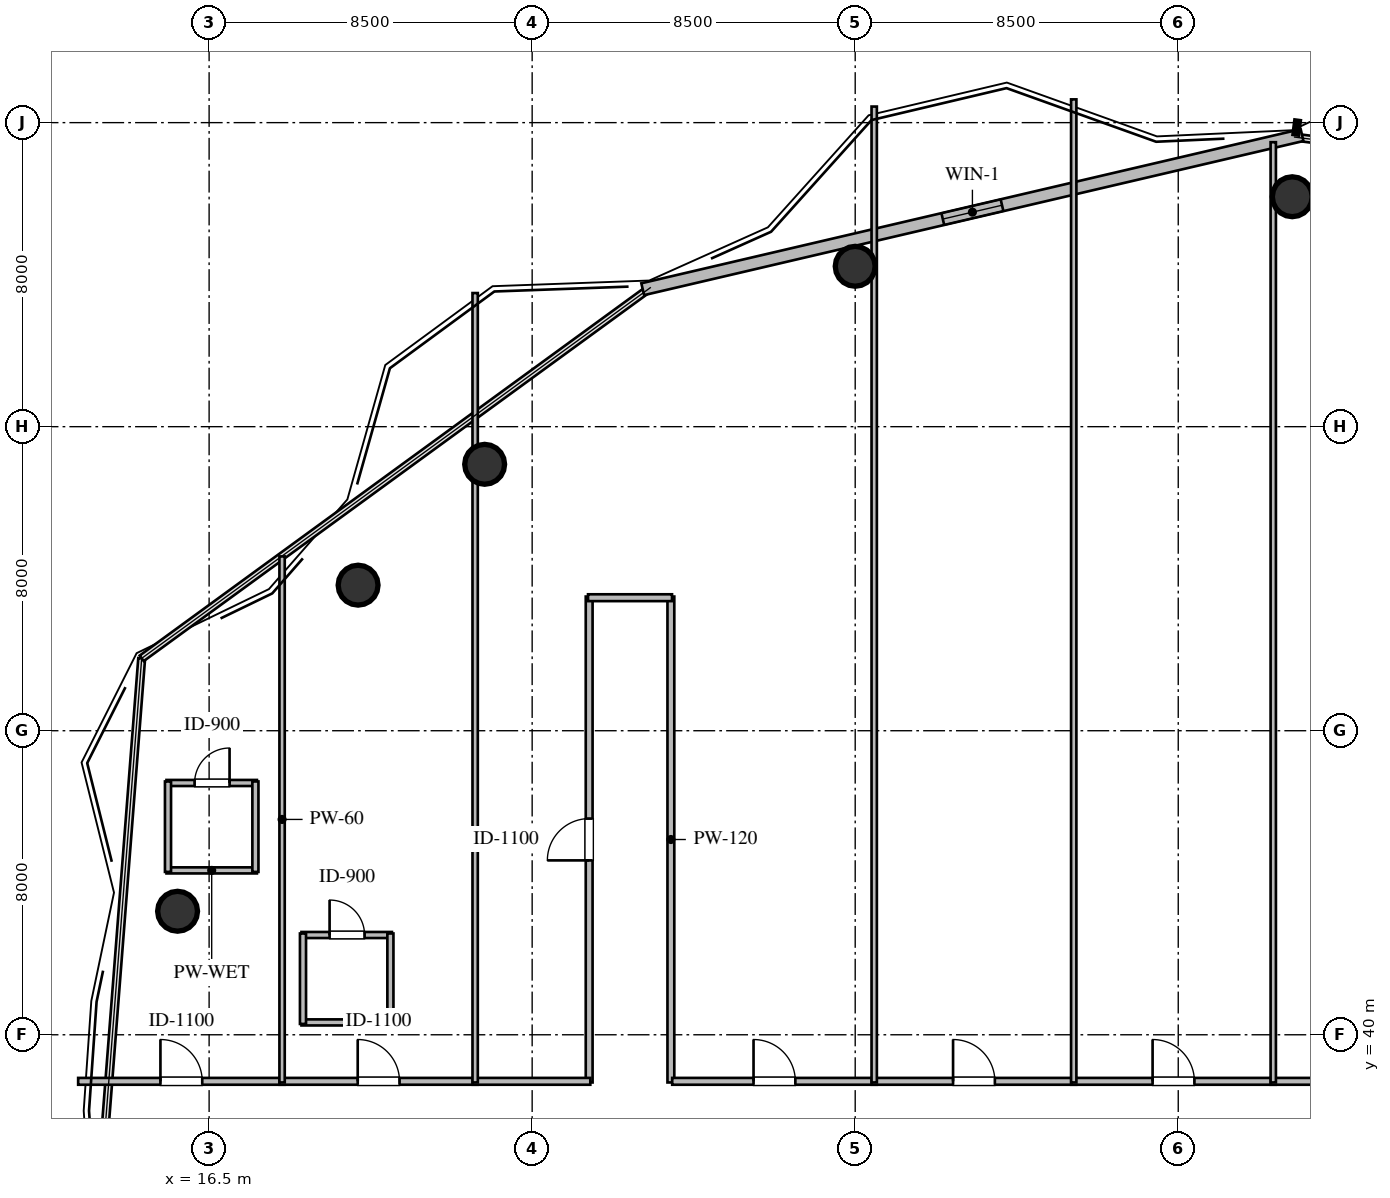
"""IFC4 building model, lengths in metres.
Left out: names, types, materials, properties, quantities, classifications, styles, units other than length and angle.
Written with IfcOpenShell. Run it as: python <this file> out.ifc"""

import sys

from ifc_helpers import new_model, si_unit, direction, frame, frame_2d, origin, origin_2d, place, context, subcontext, project, spatial, rectangle, circle, extrude, element, fill, save


model = new_model("IFC4")
c1 = context("Model", 3, precision=1e-05, world=origin(), true_north=direction((0.0, 1.0)))
c2 = subcontext(c1, "Body", "Model", "MODEL_VIEW")
j1 = project(units=[si_unit("LENGTHUNIT", "METRE"), si_unit("PLANEANGLEUNIT", "RADIAN")], contexts=[c1])
p1 = place(None, origin())
s1 = spatial("IfcSite", under=j1, at=p1, CompositionType="ELEMENT")
p2 = place(p1, origin())
s2 = spatial("IfcBuilding", under=s1, at=p2, CompositionType="ELEMENT")
p3 = place(p2, frame((0.0, 0.0, 217.2)))
s3 = spatial("IfcBuildingStorey", under=s2, at=p3, CompositionType="ELEMENT", Elevation=217.2)
for number, where, z_axis, x_axis in (
    (1, (45.0, 62.05, 0.0), (0.0, 0.0, 1.0), (1.0, 0.0, 0.0)),
    (2, (33.5, 60.22, 0.0), (0.0, 0.0, 1.0), (1.0, 0.0, 0.0)),
    (3, (23.75, 55.01, 0.0), (0.0, 0.0, 1.0), (1.0, 0.0, 0.0)),
    (4, (20.42, 51.83, 0.0), (0.0, 0.0, 1.0), (1.0, 0.0, 0.0)),
    (5, (15.67, 43.25, 0.0), (0.0, 0.0, 1.0), (1.0, 0.0, 0.0)),
):
    element("IfcColumn", number, at=place(p3, frame(where, z_axis=z_axis, x_axis=x_axis)), inside=s3, PredefinedType="COLUMN", context=c2, shape_type="SweptSolid", body=[
        extrude(circle(Radius=0.525, at=origin_2d()), origin(), (0.0, 0.0, 1.0), 3.6),
    ])
p4 = place(p3, frame((27.909, 59.617, 0.0), z_axis=(0.0, 0.0, 1.0), x_axis=(0.973753606594, 0.227604731158, 0.0)))
e6 = element("IfcWall", 6, at=p4, inside=s3, PredefinedType="STANDARD", context=c2, shape_type="SweptSolid", body=[
    extrude(rectangle(XDim=17.817, YDim=0.32, at=frame_2d((8.908, 0.0))), origin(), (0.0, 0.0, 1.0), 3.36),
])
p5 = place(p4, frame((8.109, 0.0, 1.05)))
e7 = element("IfcOpeningElement", 7, at=p5, cuts=e6, PredefinedType="OPENING", context=c2, shape_type="SweptSolid", body=[
    extrude(rectangle(XDim=1.6, YDim=1.5, at=frame_2d((0.8, 0.75))), frame((0.0, 0.17, 0.0), z_axis=(0.0, -1.0, 0.0), x_axis=(1.0, 0.0, 0.0)), (0.0, 0.0, 1.0), 0.34),
])
p6 = place(p3, frame((15.378, 44.325, 0.0), z_axis=(0.0, 0.0, 1.0), x_axis=(1.0, 0.0, 0.0)))
e8 = element("IfcWall", 8, at=p6, inside=s3, PredefinedType="PLUMBINGWALL", context=c2, shape_type="SweptSolid", body=[
    extrude(rectangle(XDim=2.38, YDim=0.16, at=frame_2d((1.19, 0.0))), origin(), (0.0, 0.0, 1.0), 3.36),
])
p7 = place(p3, frame((15.378, 46.625, 0.0), z_axis=(0.0, 0.0, 1.0), x_axis=(1.0, 0.0, 0.0)))
e9 = element("IfcWall", 9, at=p7, inside=s3, PredefinedType="PLUMBINGWALL", context=c2, shape_type="SweptSolid", body=[
    extrude(rectangle(XDim=2.38, YDim=0.16, at=frame_2d((1.19, 0.0))), origin(), (0.0, 0.0, 1.0), 3.36),
])
p8 = place(p7, frame((0.74, 0.0, 0.0)))
e10 = element("IfcOpeningElement", 10, at=p8, cuts=e9, PredefinedType="OPENING", context=c2, shape_type="SweptSolid", body=[
    extrude(rectangle(XDim=0.92, YDim=2.1, at=frame_2d((0.46, 1.05))), frame((0.0, 0.09, 0.0), z_axis=(0.0, -1.0, 0.0), x_axis=(1.0, 0.0, 0.0)), (0.0, 0.0, 1.0), 0.18),
])
for number, where, z_axis, x_axis in (
    (11, (15.418, 44.285, 0.0), (0.0, 0.0, 1.0), (0.0, 1.0, 0.0)),
    (12, (17.718, 44.285, 0.0), (0.0, 0.0, 1.0), (0.0, 1.0, 0.0)),
    (13, (18.93, 40.325, 0.0), (0.0, 0.0, 1.0), (1.0, 0.0, 0.0)),
):
    element("IfcWall", number, at=place(p3, frame(where, z_axis=z_axis, x_axis=x_axis)), inside=s3, PredefinedType="PLUMBINGWALL", context=c2, shape_type="SweptSolid", body=[
        extrude(rectangle(XDim=2.38, YDim=0.16, at=frame_2d((1.19, 0.0))), origin(), (0.0, 0.0, 1.0), 3.36),
    ])
p9 = place(p3, frame((18.93, 42.625, 0.0), z_axis=(0.0, 0.0, 1.0), x_axis=(1.0, 0.0, 0.0)))
e14 = element("IfcWall", 14, at=p9, inside=s3, PredefinedType="PLUMBINGWALL", context=c2, shape_type="SweptSolid", body=[
    extrude(rectangle(XDim=2.38, YDim=0.16, at=frame_2d((1.19, 0.0))), origin(), (0.0, 0.0, 1.0), 3.36),
])
p10 = place(p9, frame((0.74, 0.0, 0.0)))
e15 = element("IfcOpeningElement", 15, at=p10, cuts=e14, PredefinedType="OPENING", context=c2, shape_type="SweptSolid", body=[
    extrude(rectangle(XDim=0.92, YDim=2.1, at=frame_2d((0.46, 1.05))), frame((0.0, 0.09, 0.0), z_axis=(0.0, -1.0, 0.0), x_axis=(1.0, 0.0, 0.0)), (0.0, 0.0, 1.0), 0.18),
])
p11 = place(p3, frame((18.97, 40.285, 0.0), z_axis=(0.0, 0.0, 1.0), x_axis=(0.0, 1.0, 0.0)))
e16 = element("IfcWall", 16, at=p11, inside=s3, PredefinedType="PLUMBINGWALL", context=c2, shape_type="SweptSolid", body=[
    extrude(rectangle(XDim=2.38, YDim=0.16, at=frame_2d((1.19, 0.0))), origin(), (0.0, 0.0, 1.0), 3.36),
])
p12 = place(p3, frame((21.27, 40.285, 0.0), z_axis=(0.0, 0.0, 1.0), x_axis=(0.0, 1.0, 0.0)))
e17 = element("IfcWall", 17, at=p12, inside=s3, PredefinedType="PLUMBINGWALL", context=c2, shape_type="SweptSolid", body=[
    extrude(rectangle(XDim=2.38, YDim=0.16, at=frame_2d((1.19, 0.0))), origin(), (0.0, 0.0, 1.0), 2.89),
])
p13 = place(p3, frame((13.054, 38.775, 0.0), z_axis=(0.0, 0.0, 1.0), x_axis=(1.0, 0.0, 0.0)))
e18 = element("IfcWall", 18, at=p13, inside=s3, PredefinedType="PARTITIONING", context=c2, shape_type="SweptSolid", body=[
    extrude(rectangle(XDim=5.431, YDim=0.18, at=frame_2d((2.716, 0.0))), origin(), (0.0, 0.0, 1.0), 3.36),
])
p14 = place(p13, frame((2.165, 0.0, 0.0)))
e19 = element("IfcOpeningElement", 19, at=p14, cuts=e18, PredefinedType="OPENING", context=c2, shape_type="SweptSolid", body=[
    extrude(rectangle(XDim=1.1, YDim=2.1, at=frame_2d((0.55, 1.05))), frame((0.0, 0.1, 0.0), z_axis=(0.0, -1.0, 0.0), x_axis=(1.0, 0.0, 0.0)), (0.0, 0.0, 1.0), 0.2),
])
p15 = place(p3, frame((18.355, 38.775, 0.0), z_axis=(0.0, 0.0, 1.0), x_axis=(1.0, 0.0, 0.0)))
e20 = element("IfcWall", 20, at=p15, inside=s3, PredefinedType="PARTITIONING", context=c2, shape_type="SweptSolid", body=[
    extrude(rectangle(XDim=5.21, YDim=0.18, at=frame_2d((2.605, 0.0))), origin(), (0.0, 0.0, 1.0), 3.36),
])
p16 = place(p15, frame((2.055, 0.0, 0.0)))
e21 = element("IfcOpeningElement", 21, at=p16, cuts=e20, PredefinedType="OPENING", context=c2, shape_type="SweptSolid", body=[
    extrude(rectangle(XDim=1.1, YDim=2.1, at=frame_2d((0.55, 1.05))), frame((0.0, 0.1, 0.0), z_axis=(0.0, -1.0, 0.0), x_axis=(1.0, 0.0, 0.0)), (0.0, 0.0, 1.0), 0.2),
])
p17 = place(p3, frame((26.5, 38.745, 0.0), z_axis=(0.0, 0.0, 1.0), x_axis=(0.0, 1.0, 0.0)))
e22 = element("IfcWall", 22, at=p17, inside=s3, PredefinedType="PARTITIONING", context=c2, shape_type="SweptSolid", body=[
    extrude(rectangle(XDim=12.785, YDim=0.18, at=frame_2d((6.393, 0.0))), origin(), (0.0, 0.0, 1.0), 3.36),
])
p18 = place(p17, frame((5.843, 0.0, 0.0)))
e23 = element("IfcOpeningElement", 23, at=p18, cuts=e22, PredefinedType="OPENING", context=c2, shape_type="SweptSolid", body=[
    extrude(rectangle(XDim=1.1, YDim=2.1, at=frame_2d((0.55, 1.05))), frame((0.0, 0.1, 0.0), z_axis=(0.0, -1.0, 0.0), x_axis=(1.0, 0.0, 0.0)), (0.0, 0.0, 1.0), 0.2),
])
p19 = place(p3, frame((28.65, 51.53, 0.0), z_axis=(0.0, 0.0, 1.0), x_axis=(0.0, -1.0, 0.0)))
e24 = element("IfcWall", 24, at=p19, inside=s3, PredefinedType="PARTITIONING", context=c2, shape_type="SweptSolid", body=[
    extrude(rectangle(XDim=12.785, YDim=0.18, at=frame_2d((6.393, 0.0))), origin(), (0.0, 0.0, 1.0), 3.36),
])
p20 = place(p3, frame((23.435, 38.775, 0.0), z_axis=(0.0, 0.0, 1.0), x_axis=(1.0, 0.0, 0.0)))
e25 = element("IfcWall", 25, at=p20, inside=s3, PredefinedType="PARTITIONING", context=c2, shape_type="SweptSolid", body=[
    extrude(rectangle(XDim=3.095, YDim=0.18, at=frame_2d((1.547, 0.0))), origin(), (0.0, 0.0, 1.0), 3.36),
])
p21 = place(p3, frame((26.47, 51.5, 0.0), z_axis=(0.0, 0.0, 1.0), x_axis=(1.0, 0.0, 0.0)))
e26 = element("IfcWall", 26, at=p21, inside=s3, PredefinedType="PARTITIONING", context=c2, shape_type="SweptSolid", body=[
    extrude(rectangle(XDim=2.21, YDim=0.18, at=frame_2d((1.105, 0.0))), origin(), (0.0, 0.0, 1.0), 3.36),
])
p22 = place(p3, frame((28.685, 38.775, 0.0), z_axis=(0.0, 0.0, 1.0), x_axis=(1.0, 0.0, 0.0)))
e27 = element("IfcWall", 27, at=p22, inside=s3, PredefinedType="PARTITIONING", context=c2, shape_type="SweptSolid", body=[
    extrude(rectangle(XDim=5.38, YDim=0.18, at=frame_2d((2.69, 0.0))), origin(), (0.0, 0.0, 1.0), 3.36),
])
p23 = place(p22, frame((2.14, 0.0, 0.0)))
e28 = element("IfcOpeningElement", 28, at=p23, cuts=e27, PredefinedType="OPENING", context=c2, shape_type="SweptSolid", body=[
    extrude(rectangle(XDim=1.1, YDim=2.1, at=frame_2d((0.55, 1.05))), frame((0.0, 0.1, 0.0), z_axis=(0.0, -1.0, 0.0), x_axis=(1.0, 0.0, 0.0)), (0.0, 0.0, 1.0), 0.2),
])
p24 = place(p3, frame((33.935, 38.775, 0.0), z_axis=(0.0, 0.0, 1.0), x_axis=(1.0, 0.0, 0.0)))
e29 = element("IfcWall", 29, at=p24, inside=s3, PredefinedType="PARTITIONING", context=c2, shape_type="SweptSolid", body=[
    extrude(rectangle(XDim=5.38, YDim=0.18, at=frame_2d((2.69, 0.0))), origin(), (0.0, 0.0, 1.0), 3.36),
])
p25 = place(p24, frame((2.14, 0.0, 0.0)))
e30 = element("IfcOpeningElement", 30, at=p25, cuts=e29, PredefinedType="OPENING", context=c2, shape_type="SweptSolid", body=[
    extrude(rectangle(XDim=1.1, YDim=2.1, at=frame_2d((0.55, 1.05))), frame((0.0, 0.1, 0.0), z_axis=(0.0, -1.0, 0.0), x_axis=(1.0, 0.0, 0.0)), (0.0, 0.0, 1.0), 0.2),
])
p26 = place(p3, frame((39.185, 38.775, 0.0), z_axis=(0.0, 0.0, 1.0), x_axis=(1.0, 0.0, 0.0)))
e31 = element("IfcWall", 31, at=p26, inside=s3, PredefinedType="PARTITIONING", context=c2, shape_type="SweptSolid", body=[
    extrude(rectangle(XDim=5.38, YDim=0.18, at=frame_2d((2.69, 0.0))), origin(), (0.0, 0.0, 1.0), 3.36),
])
p27 = place(p26, frame((2.14, 0.0, 0.0)))
e32 = element("IfcOpeningElement", 32, at=p27, cuts=e31, PredefinedType="OPENING", context=c2, shape_type="SweptSolid", body=[
    extrude(rectangle(XDim=1.1, YDim=2.1, at=frame_2d((0.55, 1.05))), frame((0.0, 0.1, 0.0), z_axis=(0.0, -1.0, 0.0), x_axis=(1.0, 0.0, 0.0)), (0.0, 0.0, 1.0), 0.2),
])
p28 = place(p3, frame((44.435, 38.775, 0.0), z_axis=(0.0, 0.0, 1.0), x_axis=(1.0, 0.0, 0.0)))
e33 = element("IfcWall", 33, at=p28, inside=s3, PredefinedType="PARTITIONING", context=c2, shape_type="SweptSolid", body=[
    extrude(rectangle(XDim=5.63, YDim=0.18, at=frame_2d((2.815, 0.0))), origin(), (0.0, 0.0, 1.0), 3.36),
])
p29 = place(p28, frame((2.265, 0.0, 0.0)))
e34 = element("IfcOpeningElement", 34, at=p29, cuts=e33, PredefinedType="OPENING", context=c2, shape_type="SweptSolid", body=[
    extrude(rectangle(XDim=1.1, YDim=2.1, at=frame_2d((0.55, 1.05))), frame((0.0, 0.1, 0.0), z_axis=(0.0, -1.0, 0.0), x_axis=(1.0, 0.0, 0.0)), (0.0, 0.0, 1.0), 0.2),
])
p30 = place(p3, frame((18.42, 52.587, 0.0), z_axis=(0.0, 0.0, 1.0), x_axis=(0.0, -1.0, 0.0)))
e35 = element("IfcWall", 35, at=p30, inside=s3, PredefinedType="PARTITIONING", context=c2, shape_type="SweptSolid", body=[
    extrude(rectangle(XDim=13.842, YDim=0.14, at=frame_2d((6.921, 0.0))), origin(), (0.0, 0.0, 1.0), 3.36),
])
p31 = place(p3, frame((23.5, 59.516, 0.0), z_axis=(0.0, 0.0, 1.0), x_axis=(0.0, -1.0, 0.0)))
e36 = element("IfcWall", 36, at=p31, inside=s3, PredefinedType="PARTITIONING", context=c2, shape_type="SweptSolid", body=[
    extrude(rectangle(XDim=20.771, YDim=0.14, at=frame_2d((10.385, 0.0))), origin(), (0.0, 0.0, 1.0), 2.89),
])
p32 = place(p3, frame((34.0, 64.423, 0.0), z_axis=(0.0, 0.0, 1.0), x_axis=(0.0, -1.0, 0.0)))
e37 = element("IfcWall", 37, at=p32, inside=s3, PredefinedType="PARTITIONING", context=c2, shape_type="SweptSolid", body=[
    extrude(rectangle(XDim=25.678, YDim=0.14, at=frame_2d((12.839, 0.0))), origin(), (0.0, 0.0, 1.0), 2.89),
])
p33 = place(p3, frame((39.25, 64.612, 0.0), z_axis=(0.0, 0.0, 1.0), x_axis=(0.0, -1.0, 0.0)))
e38 = element("IfcWall", 38, at=p33, inside=s3, PredefinedType="PARTITIONING", context=c2, shape_type="SweptSolid", body=[
    extrude(rectangle(XDim=25.867, YDim=0.14, at=frame_2d((12.934, 0.0))), origin(), (0.0, 0.0, 1.0), 3.36),
])
p34 = place(p3, frame((44.5, 63.485, 0.0), z_axis=(0.0, 0.0, 1.0), x_axis=(0.0, -1.0, 0.0)))
e39 = element("IfcWall", 39, at=p34, inside=s3, PredefinedType="PARTITIONING", context=c2, shape_type="SweptSolid", body=[
    extrude(rectangle(XDim=24.74, YDim=0.14, at=frame_2d((12.37, 0.0))), origin(), (0.0, 0.0, 1.0), 2.89),
])
p35 = place(p5, origin())
e40 = element("IfcWindow", 40, at=p35, inside=s3, PartitioningType="SINGLE_PANEL", PredefinedType="WINDOW", context=c2, shape_type="SweptSolid", body=[
    extrude(rectangle(XDim=1.6, YDim=1.5, at=frame_2d((0.8, 0.75))), frame((0.0, 0.03, 0.0), z_axis=(0.0, -1.0, 0.0), x_axis=(1.0, 0.0, 0.0)), (0.0, 0.0, 1.0), 0.06),
])
fill(e7, e40)
p36 = place(p8, origin())
e41 = element("IfcDoor", 41, at=p36, inside=s3, OperationType="SINGLE_SWING_RIGHT", PredefinedType="DOOR", context=c2, shape_type="SweptSolid", body=[
    extrude(rectangle(XDim=0.92, YDim=2.1, at=frame_2d((0.46, 1.05))), frame((0.0, 0.025, 0.0), z_axis=(0.0, -1.0, 0.0), x_axis=(1.0, 0.0, 0.0)), (0.0, 0.0, 1.0), 0.05),
])
fill(e10, e41)
p37 = place(p10, origin())
e42 = element("IfcDoor", 42, at=p37, inside=s3, OperationType="SINGLE_SWING_LEFT", PredefinedType="DOOR", context=c2, shape_type="SweptSolid", body=[
    extrude(rectangle(XDim=0.92, YDim=2.1, at=frame_2d((0.46, 1.05))), frame((0.0, 0.025, 0.0), z_axis=(0.0, -1.0, 0.0), x_axis=(1.0, 0.0, 0.0)), (0.0, 0.0, 1.0), 0.05),
])
fill(e15, e42)
p38 = place(p14, origin())
e43 = element("IfcDoor", 43, at=p38, inside=s3, OperationType="SINGLE_SWING_LEFT", PredefinedType="DOOR", context=c2, shape_type="SweptSolid", body=[
    extrude(rectangle(XDim=1.1, YDim=2.1, at=frame_2d((0.55, 1.05))), frame((0.0, 0.025, 0.0), z_axis=(0.0, -1.0, 0.0), x_axis=(1.0, 0.0, 0.0)), (0.0, 0.0, 1.0), 0.05),
])
fill(e19, e43)
p39 = place(p16, origin())
e44 = element("IfcDoor", 44, at=p39, inside=s3, OperationType="SINGLE_SWING_LEFT", PredefinedType="DOOR", context=c2, shape_type="SweptSolid", body=[
    extrude(rectangle(XDim=1.1, YDim=2.1, at=frame_2d((0.55, 1.05))), frame((0.0, 0.025, 0.0), z_axis=(0.0, -1.0, 0.0), x_axis=(1.0, 0.0, 0.0)), (0.0, 0.0, 1.0), 0.05),
])
fill(e21, e44)
p40 = place(p18, origin())
e45 = element("IfcDoor", 45, at=p40, inside=s3, OperationType="SINGLE_SWING_LEFT", PredefinedType="DOOR", context=c2, shape_type="SweptSolid", body=[
    extrude(rectangle(XDim=1.1, YDim=2.1, at=frame_2d((0.55, 1.05))), frame((0.0, 0.025, 0.0), z_axis=(0.0, -1.0, 0.0), x_axis=(1.0, 0.0, 0.0)), (0.0, 0.0, 1.0), 0.05),
])
fill(e23, e45)
p41 = place(p23, origin())
e46 = element("IfcDoor", 46, at=p41, inside=s3, OperationType="SINGLE_SWING_LEFT", PredefinedType="DOOR", context=c2, shape_type="SweptSolid", body=[
    extrude(rectangle(XDim=1.1, YDim=2.1, at=frame_2d((0.55, 1.05))), frame((0.0, 0.025, 0.0), z_axis=(0.0, -1.0, 0.0), x_axis=(1.0, 0.0, 0.0)), (0.0, 0.0, 1.0), 0.05),
])
fill(e28, e46)
p42 = place(p25, origin())
e47 = element("IfcDoor", 47, at=p42, inside=s3, OperationType="SINGLE_SWING_LEFT", PredefinedType="DOOR", context=c2, shape_type="SweptSolid", body=[
    extrude(rectangle(XDim=1.1, YDim=2.1, at=frame_2d((0.55, 1.05))), frame((0.0, 0.025, 0.0), z_axis=(0.0, -1.0, 0.0), x_axis=(1.0, 0.0, 0.0)), (0.0, 0.0, 1.0), 0.05),
])
fill(e30, e47)
p43 = place(p27, origin())
e48 = element("IfcDoor", 48, at=p43, inside=s3, OperationType="SINGLE_SWING_LEFT", PredefinedType="DOOR", context=c2, shape_type="SweptSolid", body=[
    extrude(rectangle(XDim=1.1, YDim=2.1, at=frame_2d((0.55, 1.05))), frame((0.0, 0.025, 0.0), z_axis=(0.0, -1.0, 0.0), x_axis=(1.0, 0.0, 0.0)), (0.0, 0.0, 1.0), 0.05),
])
fill(e32, e48)
save(model, sys.argv[1])
